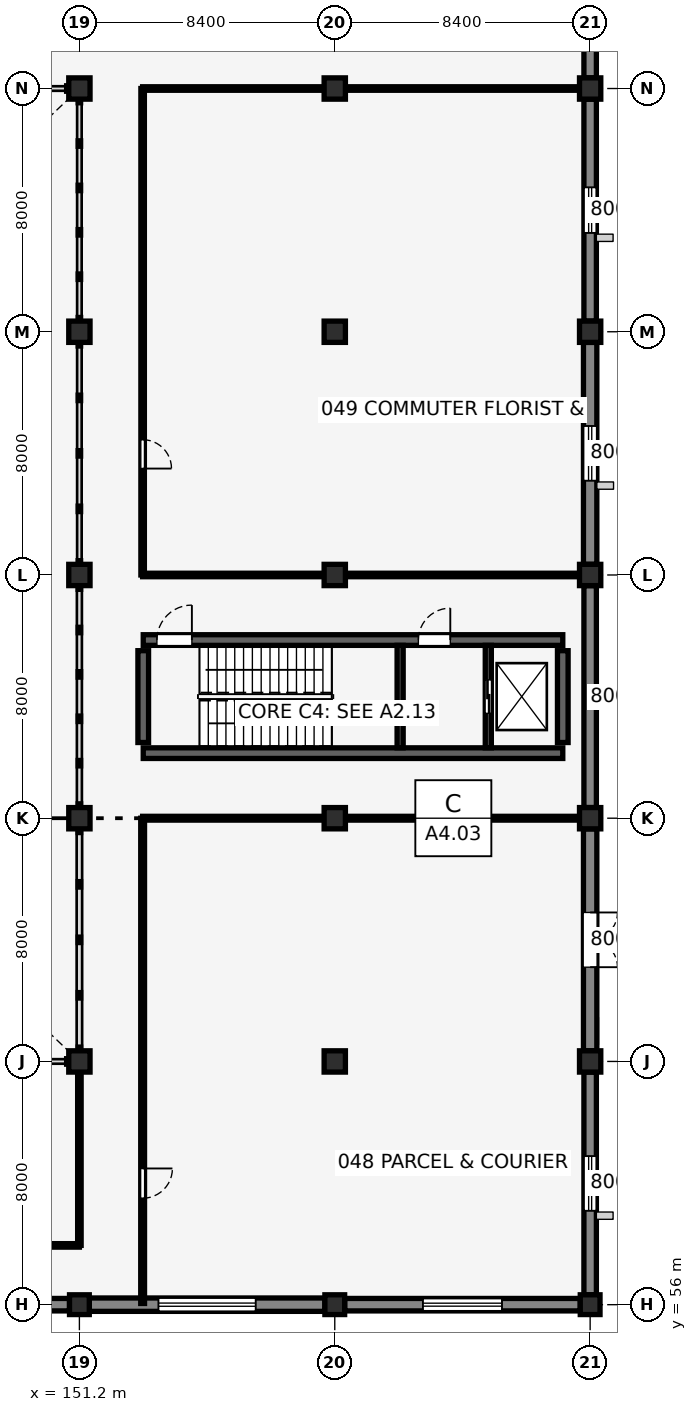
"""IFC4 building model, lengths in metres.
Left out: names, types, materials, properties, quantities, classifications, styles, units other than length and angle.
Written with IfcOpenShell. Run it as: python <this file> out.ifc"""

import sys

from ifc_helpers import new_model, si_unit, direction, frame, frame_2d, origin, origin_2d, place, context, subcontext, project, spatial, rectangle, extrude, element, fill, save


model = new_model("IFC4")
c1 = context("Model", 3, precision=1e-05, world=origin(), true_north=direction((0.0, 1.0)))
c2 = subcontext(c1, "Body", "Model", "MODEL_VIEW")
j1 = project(units=[si_unit("LENGTHUNIT", "METRE"), si_unit("PLANEANGLEUNIT", "RADIAN")], contexts=[c1])
p1 = place(None, origin())
s1 = spatial("IfcSite", under=j1, at=p1, CompositionType="ELEMENT")
p2 = place(p1, origin())
s2 = spatial("IfcBuilding", under=s1, at=p2, CompositionType="ELEMENT")
p3 = place(p2, origin())
s3 = spatial("IfcBuildingStorey", under=s2, at=p3, CompositionType="ELEMENT", Elevation=0.0)
p4 = place(p3, frame((153.3, 74.14, 0.0), z_axis=(0.0, 0.0, 1.0), x_axis=(1.0, 0.0, 0.0)))
e1 = element("IfcWall", 1, at=p4, inside=s3, PredefinedType="SHEAR", context=c2, shape_type="SweptSolid", body=[
    extrude(rectangle(XDim=13.8, YDim=0.35, at=frame_2d((6.9, 0.0))), origin(), (0.0, 0.0, 1.0), 5.15),
])
p5 = place(p3, frame((153.3, 77.86, 0.0), z_axis=(0.0, 0.0, 1.0), x_axis=(1.0, 0.0, 0.0)))
e2 = element("IfcWall", 2, at=p5, inside=s3, PredefinedType="SHEAR", context=c2, shape_type="SweptSolid", body=[
    extrude(rectangle(XDim=13.8, YDim=0.35, at=frame_2d((6.9, 0.0))), origin(), (0.0, 0.0, 1.0), 5.15),
])
p6 = place(p5, frame((0.45, 0.0, 0.0), z_axis=(0.0, 0.0, 1.0), x_axis=(1.0, 0.0, 0.0)))
e3 = element("IfcOpeningElement", 3, at=p6, cuts=e2, PredefinedType="OPENING", context=c2, shape_type="SweptSolid", body=[
    extrude(rectangle(XDim=1.15, YDim=2.15, at=frame_2d((0.575, 1.075))), frame((0.0, 0.185, 0.0), z_axis=(0.0, -1.0, 0.0), x_axis=(1.0, 0.0, 0.0)), (0.0, 0.0, 1.0), 0.37),
])
p7 = place(p5, frame((9.05, 0.0, 0.0), z_axis=(0.0, 0.0, 1.0), x_axis=(1.0, 0.0, 0.0)))
e4 = element("IfcOpeningElement", 4, at=p7, cuts=e2, PredefinedType="OPENING", context=c2, shape_type="SweptSolid", body=[
    extrude(rectangle(XDim=1.05, YDim=2.15, at=frame_2d((0.525, 1.075))), frame((0.0, 0.185, 0.0), z_axis=(0.0, -1.0, 0.0), x_axis=(1.0, 0.0, 0.0)), (0.0, 0.0, 1.0), 0.37),
])
for number, where, z_axis, x_axis in (
    (5, (153.3, 74.49, 0.0), (0.0, 0.0, 1.0), (0.0, 1.0, 0.0)),
    (6, (167.1, 74.49, 0.0), (0.0, 0.0, 1.0), (0.0, 1.0, 0.0)),
):
    element("IfcWall", number, at=place(p3, frame(where, z_axis=z_axis, x_axis=x_axis)), inside=s3, PredefinedType="SHEAR", context=c2, shape_type="SweptSolid", body=[
        extrude(rectangle(XDim=3.02, YDim=0.35, at=frame_2d((1.51, 0.0))), origin(), (0.0, 0.0, 1.0), 5.15),
    ])
p8 = place(p3, frame((151.2, 56.0, 0.0), z_axis=(0.0, 0.0, 1.0), x_axis=(1.0, 0.0, 0.0)))
e7 = element("IfcColumn", 7, at=p8, inside=s3, PredefinedType="COLUMN", context=c2, shape_type="SweptSolid", body=[
    extrude(rectangle(XDim=0.65, YDim=0.65, at=origin_2d()), origin(), (0.0, 0.0, 1.0), 5.15),
])
for number, where, z_axis, x_axis in (
    (8, (151.2, 64.0, 0.0), (0.0, 0.0, 1.0), (1.0, 0.0, 0.0)),
    (9, (151.2, 72.0, 0.0), (0.0, 0.0, 1.0), (1.0, 0.0, 0.0)),
    (10, (151.2, 80.0, 0.0), (0.0, 0.0, 1.0), (1.0, 0.0, 0.0)),
    (11, (151.2, 88.0, 0.0), (0.0, 0.0, 1.0), (1.0, 0.0, 0.0)),
    (12, (151.2, 96.0, 0.0), (0.0, 0.0, 1.0), (1.0, 0.0, 0.0)),
):
    element("IfcColumn", number, at=place(p3, frame(where, z_axis=z_axis, x_axis=x_axis)), inside=s3, PredefinedType="COLUMN", context=c2, shape_type="SweptSolid", body=[
        extrude(rectangle(XDim=0.7, YDim=0.7, at=origin_2d()), origin(), (0.0, 0.0, 1.0), 5.15),
    ])
p9 = place(p3, frame((159.6, 56.0, 0.0), z_axis=(0.0, 0.0, 1.0), x_axis=(1.0, 0.0, 0.0)))
e13 = element("IfcColumn", 13, at=p9, inside=s3, PredefinedType="COLUMN", context=c2, shape_type="SweptSolid", body=[
    extrude(rectangle(XDim=0.65, YDim=0.65, at=origin_2d()), origin(), (0.0, 0.0, 1.0), 5.15),
])
for number, where, z_axis, x_axis in (
    (14, (159.6, 64.0, 0.0), (0.0, 0.0, 1.0), (1.0, 0.0, 0.0)),
    (15, (159.6, 72.0, 0.0), (0.0, 0.0, 1.0), (1.0, 0.0, 0.0)),
    (16, (159.6, 80.0, 0.0), (0.0, 0.0, 1.0), (1.0, 0.0, 0.0)),
    (17, (159.6, 88.0, 0.0), (0.0, 0.0, 1.0), (1.0, 0.0, 0.0)),
    (18, (159.6, 96.0, 0.0), (0.0, 0.0, 1.0), (1.0, 0.0, 0.0)),
):
    element("IfcColumn", number, at=place(p3, frame(where, z_axis=z_axis, x_axis=x_axis)), inside=s3, PredefinedType="COLUMN", context=c2, shape_type="SweptSolid", body=[
        extrude(rectangle(XDim=0.7, YDim=0.7, at=origin_2d()), origin(), (0.0, 0.0, 1.0), 5.15),
    ])
p10 = place(p3, frame((168.0, 56.0, 0.0), z_axis=(0.0, 0.0, 1.0), x_axis=(1.0, 0.0, 0.0)))
e19 = element("IfcColumn", 19, at=p10, inside=s3, PredefinedType="COLUMN", context=c2, shape_type="SweptSolid", body=[
    extrude(rectangle(XDim=0.65, YDim=0.65, at=origin_2d()), origin(), (0.0, 0.0, 1.0), 5.15),
])
for number, where, z_axis, x_axis in (
    (20, (168.0, 64.0, 0.0), (0.0, 0.0, 1.0), (1.0, 0.0, 0.0)),
    (21, (168.0, 72.0, 0.0), (0.0, 0.0, 1.0), (1.0, 0.0, 0.0)),
    (22, (168.0, 80.0, 0.0), (0.0, 0.0, 1.0), (1.0, 0.0, 0.0)),
    (23, (168.0, 88.0, 0.0), (0.0, 0.0, 1.0), (1.0, 0.0, 0.0)),
    (24, (168.0, 96.0, 0.0), (0.0, 0.0, 1.0), (1.0, 0.0, 0.0)),
):
    element("IfcColumn", number, at=place(p3, frame(where, z_axis=z_axis, x_axis=x_axis)), inside=s3, PredefinedType="COLUMN", context=c2, shape_type="SweptSolid", body=[
        extrude(rectangle(XDim=0.7, YDim=0.7, at=origin_2d()), origin(), (0.0, 0.0, 1.0), 5.15),
    ])
p11 = place(p3, frame((168.0, 96.35, 0.0), z_axis=(0.0, 0.0, 1.0), x_axis=(0.0, 1.0, 0.0)))
e25 = element("IfcWall", 25, at=p11, inside=s3, PredefinedType="SOLIDWALL", context=c2, shape_type="SweptSolid", body=[
    extrude(rectangle(XDim=7.325, YDim=0.41, at=frame_2d((3.663, 0.0))), origin(), (0.0, 0.0, 1.0), 4.747),
])
p12 = place(p11, frame((2.562, 0.0, 0.9), z_axis=(0.0, 0.0, 1.0), x_axis=(1.0, 0.0, 0.0)))
e26 = element("IfcOpeningElement", 26, at=p12, cuts=e25, PredefinedType="OPENING", context=c2, shape_type="SweptSolid", body=[
    extrude(rectangle(XDim=2.2, YDim=1.5, at=frame_2d((1.1, 0.75))), frame((0.0, 0.215, 0.0), z_axis=(0.0, -1.0, 0.0), x_axis=(1.0, 0.0, 0.0)), (0.0, 0.0, 1.0), 0.43),
])
p13 = place(p3, frame((168.0, 56.325, 0.0), z_axis=(0.0, 0.0, 1.0), x_axis=(0.0, 1.0, 0.0)))
e27 = element("IfcWall", 27, at=p13, inside=s3, PredefinedType="SOLIDWALL", context=c2, shape_type="SweptSolid", body=[
    extrude(rectangle(XDim=7.325, YDim=0.41, at=frame_2d((3.663, 0.0))), origin(), (0.0, 0.0, 1.0), 4.747),
])
p14 = place(p13, frame((2.762, 0.0, 0.9), z_axis=(0.0, 0.0, 1.0), x_axis=(1.0, 0.0, 0.0)))
e28 = element("IfcOpeningElement", 28, at=p14, cuts=e27, PredefinedType="OPENING", context=c2, shape_type="SweptSolid", body=[
    extrude(rectangle(XDim=1.8, YDim=1.45, at=frame_2d((0.9, 0.725))), frame((0.0, 0.215, 0.0), z_axis=(0.0, -1.0, 0.0), x_axis=(1.0, 0.0, 0.0)), (0.0, 0.0, 1.0), 0.43),
])
p15 = place(p3, frame((168.0, 64.35, 0.0), z_axis=(0.0, 0.0, 1.0), x_axis=(0.0, 1.0, 0.0)))
e29 = element("IfcWall", 29, at=p15, inside=s3, PredefinedType="SOLIDWALL", context=c2, shape_type="SweptSolid", body=[
    extrude(rectangle(XDim=7.3, YDim=0.44, at=frame_2d((3.65, 0.0))), origin(), (0.0, 0.0, 1.0), 4.747),
])
p16 = place(p15, frame((4.55, 0.0, 0.0), z_axis=(0.0, 0.0, 1.0), x_axis=(-1.0, 0.0, 0.0)))
e30 = element("IfcOpeningElement", 30, at=p16, cuts=e29, PredefinedType="OPENING", context=c2, shape_type="SweptSolid", body=[
    extrude(rectangle(XDim=1.8, YDim=2.2, at=frame_2d((0.9, 1.1))), frame((0.0, 0.23, 0.0), z_axis=(0.0, -1.0, 0.0), x_axis=(1.0, 0.0, 0.0)), (0.0, 0.0, 1.0), 0.46),
])
p17 = place(p3, frame((168.0, 72.35, 0.0), z_axis=(0.0, 0.0, 1.0), x_axis=(0.0, 1.0, 0.0)))
e31 = element("IfcWall", 31, at=p17, inside=s3, PredefinedType="SOLIDWALL", context=c2, shape_type="SweptSolid", body=[
    extrude(rectangle(XDim=7.3, YDim=0.41, at=frame_2d((3.65, 0.0))), origin(), (0.0, 0.0, 1.0), 4.85),
])
p18 = place(p3, frame((168.0, 80.35, 0.0), z_axis=(0.0, 0.0, 1.0), x_axis=(0.0, 1.0, 0.0)))
e32 = element("IfcWall", 32, at=p18, inside=s3, PredefinedType="SOLIDWALL", context=c2, shape_type="SweptSolid", body=[
    extrude(rectangle(XDim=7.3, YDim=0.44, at=frame_2d((3.65, 0.0))), origin(), (0.0, 0.0, 1.0), 4.747),
])
p19 = place(p18, frame((2.75, 0.0, 0.9), z_axis=(0.0, 0.0, 1.0), x_axis=(1.0, 0.0, 0.0)))
e33 = element("IfcOpeningElement", 33, at=p19, cuts=e32, PredefinedType="OPENING", context=c2, shape_type="SweptSolid", body=[
    extrude(rectangle(XDim=1.8, YDim=1.3, at=frame_2d((0.9, 0.65))), frame((0.0, 0.23, 0.0), z_axis=(0.0, -1.0, 0.0), x_axis=(1.0, 0.0, 0.0)), (0.0, 0.0, 1.0), 0.46),
])
p20 = place(p3, frame((168.0, 88.35, 0.0), z_axis=(0.0, 0.0, 1.0), x_axis=(0.0, 1.0, 0.0)))
e34 = element("IfcWall", 34, at=p20, inside=s3, PredefinedType="SOLIDWALL", context=c2, shape_type="SweptSolid", body=[
    extrude(rectangle(XDim=7.3, YDim=0.41, at=frame_2d((3.65, 0.0))), origin(), (0.0, 0.0, 1.0), 4.747),
])
p21 = place(p20, frame((2.9, 0.0, 0.9), z_axis=(0.0, 0.0, 1.0), x_axis=(1.0, 0.0, 0.0)))
e35 = element("IfcOpeningElement", 35, at=p21, cuts=e34, PredefinedType="OPENING", context=c2, shape_type="SweptSolid", body=[
    extrude(rectangle(XDim=1.5, YDim=1.4, at=frame_2d((0.75, 0.7))), frame((0.0, 0.215, 0.0), z_axis=(0.0, -1.0, 0.0), x_axis=(1.0, 0.0, 0.0)), (0.0, 0.0, 1.0), 0.43),
])
p22 = place(p3, frame((151.525, 56.0, 0.0), z_axis=(0.0, 0.0, 1.0), x_axis=(1.0, 0.0, 0.0)))
e36 = element("IfcWall", 36, at=p22, inside=s3, PredefinedType="SOLIDWALL", context=c2, shape_type="SweptSolid", body=[
    extrude(rectangle(XDim=7.75, YDim=0.44, at=frame_2d((3.875, 0.0))), origin(), (0.0, 0.0, 1.0), 4.74),
])
p23 = place(p22, frame((2.275, 0.0, 1.55), z_axis=(0.0, 0.0, 1.0), x_axis=(1.0, 0.0, 0.0)))
e37 = element("IfcOpeningElement", 37, at=p23, cuts=e36, PredefinedType="OPENING", context=c2, shape_type="SweptSolid", body=[
    extrude(rectangle(XDim=3.2, YDim=0.9, at=frame_2d((1.6, 0.45))), frame((0.0, 0.23, 0.0), z_axis=(0.0, -1.0, 0.0), x_axis=(1.0, 0.0, 0.0)), (0.0, 0.0, 1.0), 0.46),
])
p24 = place(p3, frame((159.925, 56.0, 0.0), z_axis=(0.0, 0.0, 1.0), x_axis=(1.0, 0.0, 0.0)))
e38 = element("IfcWall", 38, at=p24, inside=s3, PredefinedType="SOLIDWALL", context=c2, shape_type="SweptSolid", body=[
    extrude(rectangle(XDim=7.75, YDim=0.41, at=frame_2d((3.875, 0.0))), origin(), (0.0, 0.0, 1.0), 4.74),
])
p25 = place(p24, frame((2.575, 0.0, 1.55), z_axis=(0.0, 0.0, 1.0), x_axis=(1.0, 0.0, 0.0)))
e39 = element("IfcOpeningElement", 39, at=p25, cuts=e38, PredefinedType="OPENING", context=c2, shape_type="SweptSolid", body=[
    extrude(rectangle(XDim=2.6, YDim=0.85, at=frame_2d((1.3, 0.425))), frame((0.0, 0.215, 0.0), z_axis=(0.0, -1.0, 0.0), x_axis=(1.0, 0.0, 0.0)), (0.0, 0.0, 1.0), 0.43),
])
p26 = place(p3, frame((143.125, 56.0, 0.0), z_axis=(0.0, 0.0, 1.0), x_axis=(1.0, 0.0, 0.0)))
e40 = element("IfcWall", 40, at=p26, inside=s3, PredefinedType="SOLIDWALL", context=c2, shape_type="SweptSolid", body=[
    extrude(rectangle(XDim=7.75, YDim=0.41, at=frame_2d((3.875, 0.0))), origin(), (0.0, 0.0, 1.0), 4.74),
])
p27 = place(p26, frame((3.4, 0.0, 0.65), z_axis=(0.0, 0.0, 1.0), x_axis=(1.0, 0.0, 0.0)))
e41 = element("IfcOpeningElement", 41, at=p27, cuts=e40, PredefinedType="OPENING", context=c2, shape_type="SweptSolid", body=[
    extrude(rectangle(XDim=0.95, YDim=2.1, at=frame_2d((0.475, 1.05))), frame((0.0, 0.215, 0.0), z_axis=(0.0, -1.0, 0.0), x_axis=(1.0, 0.0, 0.0)), (0.0, 0.0, 1.0), 0.43),
])
p28 = place(p3, frame((161.75, 74.315, 0.0), z_axis=(0.0, 0.0, 1.0), x_axis=(0.0, 1.0, 0.0)))
e42 = element("IfcWall", 42, at=p28, inside=s3, PredefinedType="SHEAR", context=c2, shape_type="SweptSolid", body=[
    extrude(rectangle(XDim=3.37, YDim=0.2, at=frame_2d((1.685, 0.0))), origin(), (0.0, 0.0, 1.0), 5.15),
])
p29 = place(p3, frame((164.65, 74.315, 0.0), z_axis=(0.0, 0.0, 1.0), x_axis=(0.0, 1.0, 0.0)))
e43 = element("IfcWall", 43, at=p29, inside=s3, PredefinedType="SHEAR", context=c2, shape_type="SweptSolid", body=[
    extrude(rectangle(XDim=3.37, YDim=0.2, at=frame_2d((1.685, 0.0))), origin(), (0.0, 0.0, 1.0), 5.15),
])
p30 = place(p29, frame((1.135, 0.0, 0.0), z_axis=(0.0, 0.0, 1.0), x_axis=(1.0, 0.0, 0.0)))
e44 = element("IfcOpeningElement", 44, at=p30, cuts=e43, PredefinedType="OPENING", context=c2, shape_type="SweptSolid", body=[
    extrude(rectangle(XDim=1.1, YDim=2.15, at=frame_2d((0.55, 1.075))), frame((0.0, 0.11, 0.0), z_axis=(0.0, -1.0, 0.0), x_axis=(1.0, 0.0, 0.0)), (0.0, 0.0, 1.0), 0.22),
])
p31 = place(p3, frame((134.4, 57.95, 0.0), z_axis=(0.0, 0.0, 1.0), x_axis=(1.0, 0.0, 0.0)))
e45 = element("IfcWall", 45, at=p31, inside=s3, PredefinedType="PARTITIONING", context=c2, shape_type="SweptSolid", body=[
    extrude(rectangle(XDim=16.8, YDim=0.115, at=frame_2d((8.4, 0.0))), origin(), (0.0, 0.0, 1.0), 4.542),
])
p32 = place(p31, frame((3.7, 0.0, 0.0), z_axis=(0.0, 0.0, 1.0), x_axis=(1.0, 0.0, 0.0)))
e46 = element("IfcOpeningElement", 46, at=p32, cuts=e45, PredefinedType="OPENING", context=c2, shape_type="SweptSolid", body=[
    extrude(rectangle(XDim=0.95, YDim=2.15, at=frame_2d((0.475, 1.075))), frame((0.0, 0.067, 0.0), z_axis=(0.0, -1.0, 0.0), x_axis=(1.0, 0.0, 0.0)), (0.0, 0.0, 1.0), 0.135),
])
p33 = place(p3, frame((153.28, 56.04, 0.0), z_axis=(0.0, 0.0, 1.0), x_axis=(0.0, 1.0, 0.0)))
e47 = element("IfcWall", 47, at=p33, inside=s3, PredefinedType="PARTITIONING", context=c2, shape_type="SweptSolid", body=[
    extrude(rectangle(XDim=15.96, YDim=0.125, at=frame_2d((7.98, 0.0))), origin(), (0.0, 0.0, 1.0), 5.15),
])
p34 = place(p33, frame((4.44, 0.0, 0.0), z_axis=(0.0, 0.0, 1.0), x_axis=(-1.0, 0.0, 0.0)))
e48 = element("IfcOpeningElement", 48, at=p34, cuts=e47, PredefinedType="OPENING", context=c2, shape_type="SweptSolid", body=[
    extrude(rectangle(XDim=0.98, YDim=2.15, at=frame_2d((0.49, 1.075))), frame((0.0, 0.073, 0.0), z_axis=(0.0, -1.0, 0.0), x_axis=(1.0, 0.0, 0.0)), (0.0, 0.0, 1.0), 0.145),
])
p35 = place(p3, frame((153.28, 80.0, 0.0), z_axis=(0.0, 0.0, 1.0), x_axis=(0.0, 1.0, 0.0)))
e49 = element("IfcWall", 49, at=p35, inside=s3, PredefinedType="PARTITIONING", context=c2, shape_type="SweptSolid", body=[
    extrude(rectangle(XDim=16.0, YDim=0.115, at=frame_2d((8.0, 0.0))), origin(), (0.0, 0.0, 1.0), 5.15),
])
p36 = place(p35, frame((4.45, 0.0, 0.0), z_axis=(0.0, 0.0, 1.0), x_axis=(-1.0, 0.0, 0.0)))
e50 = element("IfcOpeningElement", 50, at=p36, cuts=e49, PredefinedType="OPENING", context=c2, shape_type="SweptSolid", body=[
    extrude(rectangle(XDim=0.95, YDim=2.15, at=frame_2d((0.475, 1.075))), frame((0.0, 0.067, 0.0), z_axis=(0.0, -1.0, 0.0), x_axis=(1.0, 0.0, 0.0)), (0.0, 0.0, 1.0), 0.135),
])
p37 = place(p3, frame((151.2, 57.95, 0.0), z_axis=(0.0, 0.0, 1.0), x_axis=(0.0, 1.0, 0.0)))
e51 = element("IfcWall", 51, at=p37, inside=s3, PredefinedType="PARTITIONING", context=c2, shape_type="SweptSolid", body=[
    extrude(rectangle(XDim=5.71, YDim=0.115, at=frame_2d((2.855, 0.0))), origin(), (0.0, 0.0, 1.0), 4.542),
])
p38 = place(p3, frame((153.28, 72.0, 0.0), z_axis=(0.0, 0.0, 1.0), x_axis=(1.0, 0.0, 0.0)))
e52 = element("IfcWall", 52, at=p38, inside=s3, PredefinedType="PARTITIONING", context=c2, shape_type="SweptSolid", body=[
    extrude(rectangle(XDim=5.98, YDim=0.125, at=frame_2d((2.99, 0.0))), origin(), (0.0, 0.0, 1.0), 4.605),
])
p39 = place(p3, frame((159.94, 72.0, 0.0), z_axis=(0.0, 0.0, 1.0), x_axis=(1.0, 0.0, 0.0)))
e53 = element("IfcWall", 53, at=p39, inside=s3, PredefinedType="PARTITIONING", context=c2, shape_type="SweptSolid", body=[
    extrude(rectangle(XDim=7.72, YDim=0.125, at=frame_2d((3.86, 0.0))), origin(), (0.0, 0.0, 1.0), 4.605),
])
p40 = place(p3, frame((153.28, 80.0, 0.0), z_axis=(0.0, 0.0, 1.0), x_axis=(1.0, 0.0, 0.0)))
e54 = element("IfcWall", 54, at=p40, inside=s3, PredefinedType="PARTITIONING", context=c2, shape_type="SweptSolid", body=[
    extrude(rectangle(XDim=5.98, YDim=0.115, at=frame_2d((2.99, 0.0))), origin(), (0.0, 0.0, 1.0), 4.605),
])
p41 = place(p3, frame((159.94, 80.0, 0.0), z_axis=(0.0, 0.0, 1.0), x_axis=(1.0, 0.0, 0.0)))
e55 = element("IfcWall", 55, at=p41, inside=s3, PredefinedType="PARTITIONING", context=c2, shape_type="SweptSolid", body=[
    extrude(rectangle(XDim=7.72, YDim=0.115, at=frame_2d((3.86, 0.0))), origin(), (0.0, 0.0, 1.0), 4.605),
])
p42 = place(p3, frame((153.28, 96.0, 0.0), z_axis=(0.0, 0.0, 1.0), x_axis=(1.0, 0.0, 0.0)))
e56 = element("IfcWall", 56, at=p42, inside=s3, PredefinedType="PARTITIONING", context=c2, shape_type="SweptSolid", body=[
    extrude(rectangle(XDim=5.98, YDim=0.115, at=frame_2d((2.99, 0.0))), origin(), (0.0, 0.0, 1.0), 4.605),
])
p43 = place(p3, frame((159.94, 96.0, 0.0), z_axis=(0.0, 0.0, 1.0), x_axis=(1.0, 0.0, 0.0)))
e57 = element("IfcWall", 57, at=p43, inside=s3, PredefinedType="PARTITIONING", context=c2, shape_type="SweptSolid", body=[
    extrude(rectangle(XDim=7.72, YDim=0.115, at=frame_2d((3.86, 0.0))), origin(), (0.0, 0.0, 1.0), 4.605),
])
p44 = place(p14, origin())
e58 = element("IfcWindow", 58, at=p44, inside=s3, PartitioningType="DOUBLE_PANEL_VERTICAL", PredefinedType="WINDOW", context=c2, shape_type="SweptSolid", body=[
    extrude(rectangle(XDim=1.8, YDim=1.45, at=frame_2d((0.9, 0.725))), frame((0.0, 0.03, 0.0), z_axis=(0.0, -1.0, 0.0), x_axis=(1.0, 0.0, 0.0)), (0.0, 0.0, 1.0), 0.06),
])
fill(e28, e58)
p45 = place(p16, origin())
e59 = element("IfcDoor", 59, at=p45, inside=s3, OperationType="DOUBLE_DOOR_SINGLE_SWING", PredefinedType="DOOR", context=c2, shape_type="SweptSolid", body=[
    extrude(rectangle(XDim=1.8, YDim=2.2, at=frame_2d((0.9, 1.1))), frame((0.0, 0.025, 0.0), z_axis=(0.0, -1.0, 0.0), x_axis=(1.0, 0.0, 0.0)), (0.0, 0.0, 1.0), 0.05),
])
fill(e30, e59)
p46 = place(p19, origin())
e60 = element("IfcWindow", 60, at=p46, inside=s3, PartitioningType="DOUBLE_PANEL_VERTICAL", PredefinedType="WINDOW", context=c2, shape_type="SweptSolid", body=[
    extrude(rectangle(XDim=1.8, YDim=1.3, at=frame_2d((0.9, 0.65))), frame((0.0, 0.03, 0.0), z_axis=(0.0, -1.0, 0.0), x_axis=(1.0, 0.0, 0.0)), (0.0, 0.0, 1.0), 0.06),
])
fill(e33, e60)
p47 = place(p21, origin())
e61 = element("IfcWindow", 61, at=p47, inside=s3, PartitioningType="SINGLE_PANEL", PredefinedType="WINDOW", context=c2, shape_type="SweptSolid", body=[
    extrude(rectangle(XDim=1.5, YDim=1.4, at=frame_2d((0.75, 0.7))), frame((0.0, 0.03, 0.0), z_axis=(0.0, -1.0, 0.0), x_axis=(1.0, 0.0, 0.0)), (0.0, 0.0, 1.0), 0.06),
])
fill(e35, e61)
p48 = place(p23, origin())
e62 = element("IfcWindow", 62, at=p48, inside=s3, PartitioningType="TRIPLE_PANEL_HORIZONTAL", PredefinedType="WINDOW", context=c2, shape_type="SweptSolid", body=[
    extrude(rectangle(XDim=3.2, YDim=0.9, at=frame_2d((1.6, 0.45))), frame((0.0, 0.03, 0.0), z_axis=(0.0, -1.0, 0.0), x_axis=(1.0, 0.0, 0.0)), (0.0, 0.0, 1.0), 0.06),
])
fill(e37, e62)
p49 = place(p25, origin())
e63 = element("IfcWindow", 63, at=p49, inside=s3, PartitioningType="DOUBLE_PANEL_HORIZONTAL", PredefinedType="WINDOW", context=c2, shape_type="SweptSolid", body=[
    extrude(rectangle(XDim=2.6, YDim=0.85, at=frame_2d((1.3, 0.425))), frame((0.0, 0.03, 0.0), z_axis=(0.0, -1.0, 0.0), x_axis=(1.0, 0.0, 0.0)), (0.0, 0.0, 1.0), 0.06),
])
fill(e39, e63)
p50 = place(p6, origin())
e64 = element("IfcDoor", 64, at=p50, inside=s3, OperationType="SINGLE_SWING_RIGHT", PredefinedType="DOOR", context=c2, shape_type="SweptSolid", body=[
    extrude(rectangle(XDim=1.15, YDim=2.15, at=frame_2d((0.575, 1.075))), frame((0.0, 0.025, 0.0), z_axis=(0.0, -1.0, 0.0), x_axis=(1.0, 0.0, 0.0)), (0.0, 0.0, 1.0), 0.05),
])
fill(e3, e64)
p51 = place(p7, origin())
e65 = element("IfcDoor", 65, at=p51, inside=s3, OperationType="SINGLE_SWING_RIGHT", PredefinedType="DOOR", context=c2, shape_type="SweptSolid", body=[
    extrude(rectangle(XDim=1.05, YDim=2.15, at=frame_2d((0.525, 1.075))), frame((0.0, 0.025, 0.0), z_axis=(0.0, -1.0, 0.0), x_axis=(1.0, 0.0, 0.0)), (0.0, 0.0, 1.0), 0.05),
])
fill(e4, e65)
p52 = place(p30, origin())
e66 = element("IfcDoor", 66, at=p52, inside=s3, OperationType="DOUBLE_DOOR_SLIDING", PredefinedType="DOOR", context=c2, shape_type="SweptSolid", body=[
    extrude(rectangle(XDim=1.1, YDim=2.15, at=frame_2d((0.55, 1.075))), frame((0.0, 0.025, 0.0), z_axis=(0.0, -1.0, 0.0), x_axis=(1.0, 0.0, 0.0)), (0.0, 0.0, 1.0), 0.05),
])
fill(e44, e66)
p53 = place(p34, origin())
e67 = element("IfcDoor", 67, at=p53, inside=s3, OperationType="SINGLE_SWING_LEFT", PredefinedType="DOOR", context=c2, shape_type="SweptSolid", body=[
    extrude(rectangle(XDim=0.98, YDim=2.15, at=frame_2d((0.49, 1.075))), frame((0.0, 0.025, 0.0), z_axis=(0.0, -1.0, 0.0), x_axis=(1.0, 0.0, 0.0)), (0.0, 0.0, 1.0), 0.05),
])
fill(e48, e67)
p54 = place(p36, origin())
e68 = element("IfcDoor", 68, at=p54, inside=s3, OperationType="SINGLE_SWING_RIGHT", PredefinedType="DOOR", context=c2, shape_type="SweptSolid", body=[
    extrude(rectangle(XDim=0.95, YDim=2.15, at=frame_2d((0.475, 1.075))), frame((0.0, 0.025, 0.0), z_axis=(0.0, -1.0, 0.0), x_axis=(1.0, 0.0, 0.0)), (0.0, 0.0, 1.0), 0.05),
])
fill(e50, e68)
save(model, sys.argv[1])
